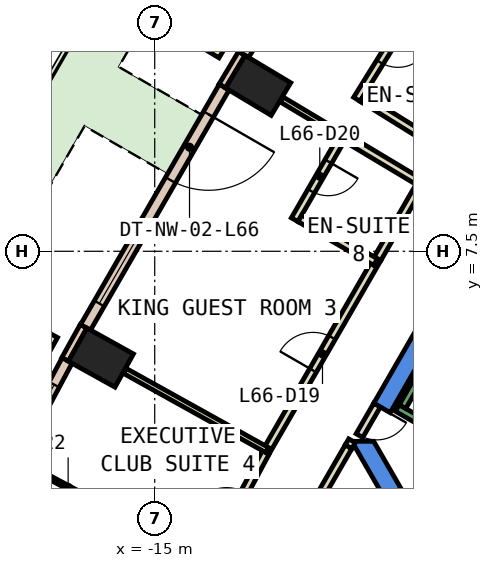
"""IFC4 building model, lengths in metres.
Left out: names, types, materials, properties, quantities, classifications, styles, units other than length and angle.
Written with IfcOpenShell. Run it as: python <this file> out.ifc"""

import sys

from ifc_helpers import new_model, si_unit, direction, frame, frame_2d, origin, origin_2d, place, context, subcontext, project, spatial, polyline, rectangle, outline, extrude, element, fill, save


model = new_model("IFC4")
c1 = context("Model", 3, precision=1e-05, world=origin(), true_north=direction((0.0, 1.0)))
c2 = subcontext(c1, "Body", "Model", "MODEL_VIEW")
j1 = project(units=[si_unit("LENGTHUNIT", "METRE"), si_unit("PLANEANGLEUNIT", "RADIAN")], contexts=[c1])
p1 = place(None, origin())
s1 = spatial("IfcSite", under=j1, at=p1, CompositionType="ELEMENT")
p2 = place(p1, origin())
s2 = spatial("IfcBuilding", under=s1, at=p2, CompositionType="ELEMENT")
p3 = place(p2, frame((0.0, 0.0, 286.4)))
s3 = spatial("IfcBuildingStorey", under=s2, at=p3, CompositionType="ELEMENT", Elevation=286.4)
for number, where, z_axis, x_axis in (
    (1, (-12.279, 11.865, 0.0), (0.0, 0.0, 1.0), (0.514, 0.858, 0.0)),
    (2, (-16.415, 4.702, 0.0), (0.0, 0.0, 1.0), (0.486, 0.874, 0.0)),
):
    element("IfcColumn", number, at=place(p3, frame(where, z_axis=z_axis, x_axis=x_axis)), inside=s3, PredefinedType="COLUMN", context=c2, shape_type="SweptSolid", body=[
        extrude(rectangle(XDim=1.0, YDim=1.4, at=origin_2d()), origin(), (0.0, 0.0, 1.0), 3.26),
    ])
p4 = place(p3, frame((0.0, 0.0, -0.6)))
e3 = element("IfcWall", 3, at=p4, inside=s3, PredefinedType="SHEAR", context=c2, shape_type="SweptSolid", body=[
    extrude(outline(polyline([(-9.236, 3.502), (-8.803, 3.253), (-4.619, 10.5), (-4.907, 11.0), (-9.236, 3.502)])), origin(), (0.0, 0.0, 1.0), 3.86),
])
p5 = place(p3, frame((0.0, 0.0, -0.6)))
e4 = element("IfcWall", 4, at=p5, inside=s3, PredefinedType="SHEAR", context=c2, shape_type="SweptSolid", body=[
    extrude(outline(polyline([(-9.815, 2.5), (-4.907, -6.0), (-4.619, -5.5), (-9.238, 2.5), (-9.815, 2.5)])), origin(), (0.0, 0.0, 1.0), 3.86),
])
p6 = place(p3, frame((-12.708, 12.706, 0.0), z_axis=(0.0, 0.0, 1.0), x_axis=(-0.513777707721, -0.857923345672, 0.0)))
e5 = element("IfcWall", 5, at=p6, inside=s3, PredefinedType="STANDARD", context=c2, shape_type="SweptSolid", body=[
    extrude(rectangle(XDim=1.0, YDim=0.2, at=frame_2d((0.5, 0.0))), origin(), (0.0, 0.0, 1.0), 3.26),
])
p7 = place(p3, frame((-16.872, 5.527, 0.0), z_axis=(0.0, 0.0, 1.0), x_axis=(-0.485850211157, -0.874042088414, 0.0)))
e6 = element("IfcWall", 6, at=p7, inside=s3, PredefinedType="STANDARD", context=c2, shape_type="SweptSolid", body=[
    extrude(rectangle(XDim=1.0, YDim=0.2, at=frame_2d((0.5, 0.0))), origin(), (0.0, 0.0, 1.0), 3.26),
])
p8 = place(p3, frame((-8.819, 18.855, 0.0), z_axis=(0.0, 0.0, 1.0), x_axis=(-0.527762071678, -0.849392250788, 0.0)))
e7 = element("IfcWall", 7, at=p8, inside=s3, PredefinedType="STANDARD", context=c2, shape_type="SweptSolid", body=[
    extrude(rectangle(XDim=7.276, YDim=0.3, at=frame_2d((3.638, 0.0))), origin(), (0.0, 0.0, 1.0), 3.26),
])
p9 = place(p8, frame((0.719, 0.0, 0.9)))
e8 = element("IfcOpeningElement", 8, at=p9, cuts=e7, PredefinedType="OPENING", context=c2, shape_type="SweptSolid", body=[
    extrude(rectangle(XDim=2.2, YDim=2.0, at=frame_2d((1.1, 1.0))), frame((0.0, 0.16, 0.0), z_axis=(0.0, -1.0, 0.0), x_axis=(1.0, 0.0, 0.0)), (0.0, 0.0, 1.0), 0.32),
])
p10 = place(p8, frame((4.357, 0.0, 0.9)))
e9 = element("IfcOpeningElement", 9, at=p10, cuts=e7, PredefinedType="OPENING", context=c2, shape_type="SweptSolid", body=[
    extrude(rectangle(XDim=2.2, YDim=2.0, at=frame_2d((1.1, 1.0))), frame((0.0, 0.16, 0.0), z_axis=(0.0, -1.0, 0.0), x_axis=(1.0, 0.0, 0.0)), (0.0, 0.0, 1.0), 0.32),
])
p11 = place(p3, frame((-13.172, 11.819, 0.0), z_axis=(0.0, 0.0, 1.0), x_axis=(-0.499945412946, -0.866056917341, 0.0)))
e10 = element("IfcWall", 10, at=p11, inside=s3, PredefinedType="STANDARD", context=c2, shape_type="SweptSolid", body=[
    extrude(rectangle(XDim=7.299, YDim=0.3, at=frame_2d((3.649, 0.0))), origin(), (0.0, 0.0, 1.0), 3.26),
])
p12 = place(p11, frame((0.825, 0.0, 0.0)))
e11 = element("IfcOpeningElement", 11, at=p12, cuts=e10, PredefinedType="OPENING", context=c2, shape_type="SweptSolid", body=[
    extrude(rectangle(XDim=2.0, YDim=2.4, at=frame_2d((1.0, 1.2))), frame((0.0, 0.16, 0.0), z_axis=(0.0, -1.0, 0.0), x_axis=(1.0, 0.0, 0.0)), (0.0, 0.0, 1.0), 0.32),
])
p13 = place(p11, frame((4.374, 0.0, 0.9)))
e12 = element("IfcOpeningElement", 12, at=p13, cuts=e10, PredefinedType="OPENING", context=c2, shape_type="SweptSolid", body=[
    extrude(rectangle(XDim=2.2, YDim=2.0, at=frame_2d((1.1, 1.0))), frame((0.0, 0.16, 0.0), z_axis=(0.0, -1.0, 0.0), x_axis=(1.0, 0.0, 0.0)), (0.0, 0.0, 1.0), 0.32),
])
p14 = place(p3, frame((-17.306, 4.626, 0.0), z_axis=(0.0, 0.0, 1.0), x_axis=(-0.471789353675, -0.881711293882, 0.0)))
e13 = element("IfcWall", 13, at=p14, inside=s3, PredefinedType="STANDARD", context=c2, shape_type="SweptSolid", body=[
    extrude(rectangle(XDim=7.277, YDim=0.3, at=frame_2d((3.638, 0.0))), origin(), (0.0, 0.0, 1.0), 3.26),
])
p15 = place(p14, frame((0.719, 0.0, 0.9)))
e14 = element("IfcOpeningElement", 14, at=p15, cuts=e13, PredefinedType="OPENING", context=c2, shape_type="SweptSolid", body=[
    extrude(rectangle(XDim=2.2, YDim=2.0, at=frame_2d((1.1, 1.0))), frame((0.0, 0.16, 0.0), z_axis=(0.0, -1.0, 0.0), x_axis=(1.0, 0.0, 0.0)), (0.0, 0.0, 1.0), 0.32),
])
p16 = place(p14, frame((4.358, 0.0, 0.9)))
e15 = element("IfcOpeningElement", 15, at=p16, cuts=e13, PredefinedType="OPENING", context=c2, shape_type="SweptSolid", body=[
    extrude(rectangle(XDim=2.2, YDim=2.0, at=frame_2d((1.1, 1.0))), frame((0.0, 0.16, 0.0), z_axis=(0.0, -1.0, 0.0), x_axis=(1.0, 0.0, 0.0)), (0.0, 0.0, 1.0), 0.32),
])
p17 = place(p3, frame((-11.736, 17.059, 0.0), z_axis=(0.0, 0.0, 1.0), x_axis=(-0.514333285091, -0.857590386984, 0.0)))
e16 = element("IfcWall", 16, at=p17, inside=s3, PredefinedType="STANDARD", context=c2, shape_type="SweptSolid", body=[
    extrude(rectangle(XDim=4.641, YDim=1.9, at=frame_2d((2.32, 0.0))), origin(), (0.0, 0.0, 1.0), 0.8),
])
p18 = place(p3, frame((-18.388, 5.691, 0.0), z_axis=(0.0, 0.0, 1.0), x_axis=(-0.485696527213, -0.874127498397, 0.0)))
e17 = element("IfcWall", 17, at=p18, inside=s3, PredefinedType="STANDARD", context=c2, shape_type="SweptSolid", body=[
    extrude(rectangle(XDim=4.641, YDim=1.9, at=frame_2d((2.321, 0.0))), origin(), (0.0, 0.0, 1.0), 0.8),
])
p19 = place(p3, frame((-9.809, 2.514, 0.0), z_axis=(0.0, 0.0, 1.0), x_axis=(-0.497849076449, -0.867263683708, 0.0)))
e18 = element("IfcWall", 18, at=p19, inside=s3, PredefinedType="PARTITIONING", context=c2, shape_type="SweptSolid", body=[
    extrude(rectangle(XDim=0.184, YDim=0.2, at=frame_2d((0.092, 0.0))), origin(), (0.0, 0.0, 1.0), 2.4),
])
p20 = place(p3, frame((-12.082, 2.207, 0.0), z_axis=(0.0, 0.0, 1.0), x_axis=(0.500123454404, 0.865954115618, 0.0)))
e19 = element("IfcWall", 19, at=p20, inside=s3, PredefinedType="PARTITIONING", context=c2, shape_type="SweptSolid", body=[
    extrude(rectangle(XDim=5.885, YDim=0.2, at=frame_2d((2.942, 0.0))), origin(), (0.0, 0.0, 1.0), 3.26),
])
p21 = place(p20, frame((2.493, 0.0, 0.0)))
e20 = element("IfcOpeningElement", 20, at=p21, cuts=e19, PredefinedType="OPENING", context=c2, shape_type="SweptSolid", body=[
    extrude(rectangle(XDim=1.0, YDim=2.1, at=frame_2d((0.5, 1.05))), frame((0.0, 0.11, 0.0), z_axis=(0.0, -1.0, 0.0), x_axis=(1.0, 0.0, 0.0)), (0.0, 0.0, 1.0), 0.22),
])
p22 = place(p3, frame((-9.139, 7.303, 0.0), z_axis=(0.0, 0.0, 1.0), x_axis=(0.499869187296, 0.866100915363, 0.0)))
e21 = element("IfcWall", 21, at=p22, inside=s3, PredefinedType="PARTITIONING", context=c2, shape_type="SweptSolid", body=[
    extrude(rectangle(XDim=2.401, YDim=0.2, at=frame_2d((1.2, 0.0))), origin(), (0.0, 0.0, 1.0), 3.26),
])
p23 = place(p3, frame((-13.666, -0.76, 0.0), z_axis=(0.0, 0.0, 1.0), x_axis=(0.471643060173, 0.881789557543, 0.0)))
e22 = element("IfcWall", 22, at=p23, inside=s3, PredefinedType="PARTITIONING", context=c2, shape_type="SweptSolid", body=[
    extrude(rectangle(XDim=3.363, YDim=0.2, at=frame_2d((1.681, 0.0))), origin(), (0.0, 0.0, 1.0), 3.26),
])
p24 = place(p23, frame((1.181, 0.0, 0.0)))
e23 = element("IfcOpeningElement", 23, at=p24, cuts=e22, PredefinedType="OPENING", context=c2, shape_type="SweptSolid", body=[
    extrude(rectangle(XDim=1.0, YDim=2.1, at=frame_2d((0.5, 1.05))), frame((0.0, 0.11, 0.0), z_axis=(0.0, -1.0, 0.0), x_axis=(1.0, 0.0, 0.0)), (0.0, 0.0, 1.0), 0.22),
])
p25 = place(p3, frame((-7.992, 14.217, 0.0), z_axis=(0.0, 0.0, 1.0), x_axis=(-0.527795797674, -0.849371294522, 0.0)))
e24 = element("IfcWall", 24, at=p25, inside=s3, PredefinedType="PARTITIONING", context=c2, shape_type="SweptSolid", body=[
    extrude(rectangle(XDim=3.2, YDim=0.2, at=frame_2d((1.6, 0.0))), origin(), (0.0, 0.0, 1.0), 3.26),
])
p26 = place(p25, frame((1.15, 0.0, 0.0)))
e25 = element("IfcOpeningElement", 25, at=p26, cuts=e24, PredefinedType="OPENING", context=c2, shape_type="SweptSolid", body=[
    extrude(rectangle(XDim=0.9, YDim=2.1, at=frame_2d((0.45, 1.05))), frame((0.0, 0.11, 0.0), z_axis=(0.0, -1.0, 0.0), x_axis=(1.0, 0.0, 0.0)), (0.0, 0.0, 1.0), 0.22),
])
p27 = place(p3, frame((-9.543, 11.531, 0.0), z_axis=(0.0, 0.0, 1.0), x_axis=(0.849400119549, -0.527749407305, 0.0)))
e26 = element("IfcWall", 26, at=p27, inside=s3, PredefinedType="PARTITIONING", context=c2, shape_type="SweptSolid", body=[
    extrude(rectangle(XDim=2.5, YDim=0.2, at=frame_2d((1.25, 0.0))), origin(), (0.0, 0.0, 1.0), 3.26),
])
p28 = place(p3, frame((-10.133, 10.58, 0.0), z_axis=(0.0, 0.0, 1.0), x_axis=(-0.857903919212, 0.513810145287, 0.0)))
e27 = element("IfcWall", 27, at=p28, inside=s3, PredefinedType="PARTITIONING", context=c2, shape_type="SweptSolid", body=[
    extrude(rectangle(XDim=1.781, YDim=0.15, at=frame_2d((0.891, 0.0))), origin(), (0.0, 0.0, 1.0), 3.26),
])
p29 = place(p3, frame((-7.989, 9.295, 0.0), z_axis=(0.0, 0.0, 1.0), x_axis=(-0.857801856135, 0.513980520654, 0.0)))
e28 = element("IfcWall", 28, at=p29, inside=s3, PredefinedType="PARTITIONING", context=c2, shape_type="SweptSolid", body=[
    extrude(rectangle(XDim=2.3, YDim=0.2, at=frame_2d((1.15, 0.0))), origin(), (0.0, 0.0, 1.0), 3.26),
])
p30 = place(p3, frame((-9.997, 10.615, 0.0), z_axis=(0.0, 0.0, 1.0), x_axis=(-0.500525697837, -0.865721679182, 0.0)))
e29 = element("IfcWall", 29, at=p30, inside=s3, PredefinedType="PARTITIONING", context=c2, shape_type="SweptSolid", body=[
    extrude(rectangle(XDim=2.639, YDim=0.2, at=frame_2d((1.32, 0.0))), origin(), (0.0, 0.0, 1.0), 3.26),
])
p31 = place(p30, frame((0.869, 0.0, 0.0)))
e30 = element("IfcOpeningElement", 30, at=p31, cuts=e29, PredefinedType="OPENING", context=c2, shape_type="SweptSolid", body=[
    extrude(rectangle(XDim=0.9, YDim=2.1, at=frame_2d((0.45, 1.05))), frame((0.0, 0.11, 0.0), z_axis=(0.0, -1.0, 0.0), x_axis=(1.0, 0.0, 0.0)), (0.0, 0.0, 1.0), 0.22),
])
p32 = place(p3, frame((-11.181, 8.367, 0.0), z_axis=(0.0, 0.0, 1.0), x_axis=(0.866053019151, -0.499952165731, 0.0)))
e31 = element("IfcWall", 31, at=p32, inside=s3, PredefinedType="PARTITIONING", context=c2, shape_type="SweptSolid", body=[
    extrude(rectangle(XDim=2.3, YDim=0.2, at=frame_2d((1.15, 0.0))), origin(), (0.0, 0.0, 1.0), 3.26),
])
p33 = place(p3, frame((-12.045, 2.272, 0.0), z_axis=(0.0, 0.0, 1.0), x_axis=(-0.873982340973, 0.485957680943, 0.0)))
e32 = element("IfcWall", 32, at=p33, inside=s3, PredefinedType="PARTITIONING", context=c2, shape_type="SweptSolid", body=[
    extrude(rectangle(XDim=4.28, YDim=0.15, at=frame_2d((2.14, 0.0))), origin(), (0.0, 0.0, 1.0), 3.26),
])
p34 = place(p3, frame((-16.0, 0.602, 0.0), z_axis=(0.0, 0.0, 1.0), x_axis=(-0.881743923375, 0.47172836844, 0.0)))
e33 = element("IfcWall", 33, at=p34, inside=s3, PredefinedType="PARTITIONING", context=c2, shape_type="SweptSolid", body=[
    extrude(rectangle(XDim=2.9, YDim=0.1, at=frame_2d((1.45, 0.0))), origin(), (0.0, 0.0, 1.0), 3.26),
])
p35 = place(p34, frame((1.0, 0.0, 0.0)))
e34 = element("IfcOpeningElement", 34, at=p35, cuts=e33, PredefinedType="OPENING", context=c2, shape_type="SweptSolid", body=[
    extrude(rectangle(XDim=0.9, YDim=2.1, at=frame_2d((0.45, 1.05))), frame((0.0, 0.06, 0.0), z_axis=(0.0, -1.0, 0.0), x_axis=(1.0, 0.0, 0.0)), (0.0, 0.0, 1.0), 0.12),
])
p36 = place(p3, frame((-9.15, 3.452, 0.0), z_axis=(0.0, 0.0, 1.0), x_axis=(-0.500079945886, -0.865979242085, 0.0)))
e35 = element("IfcWall", 35, at=p36, inside=s3, PredefinedType="PARTITIONING", context=c2, shape_type="SweptSolid", body=[
    extrude(rectangle(XDim=0.926, YDim=0.2, at=frame_2d((0.463, 0.0))), origin(), (0.0, 0.0, 1.0), 2.4),
])
p37 = place(p36, frame((0.017, 0.0, 0.0)))
e36 = element("IfcOpeningElement", 36, at=p37, cuts=e35, PredefinedType="OPENING", context=c2, shape_type="SweptSolid", body=[
    extrude(rectangle(XDim=0.9, YDim=2.1, at=frame_2d((0.45, 1.05))), frame((0.0, 0.11, 0.0), z_axis=(0.0, -1.0, 0.0), x_axis=(1.0, 0.0, 0.0)), (0.0, 0.0, 1.0), 0.22),
])
p38 = place(p3, frame((-9.901, 2.354, 0.0), z_axis=(0.0, 0.0, 1.0), x_axis=(-0.500374498448, -0.865809079014, 0.0)))
e37 = element("IfcWall", 37, at=p38, inside=s3, PredefinedType="PARTITIONING", context=c2, shape_type="SweptSolid", body=[
    extrude(rectangle(XDim=1.469, YDim=0.2, at=frame_2d((0.734, 0.0))), origin(), (0.0, 0.0, 1.0), 3.26),
])
p39 = place(p3, frame((-6.25, 2.01, 0.0), z_axis=(0.0, 0.0, 1.0), x_axis=(-0.86611865017, 0.499838457731, 0.0)))
e38 = element("IfcWall", 38, at=p39, inside=s3, PredefinedType="STANDARD", context=c2, shape_type="SweptSolid", body=[
    extrude(rectangle(XDim=2.733, YDim=0.2, at=frame_2d((1.366, 0.0))), origin(), (0.0, 0.0, 1.0), 3.26),
])
p40 = place(p3, frame((-5.03, 9.388, 0.0), z_axis=(0.0, 0.0, 1.0), x_axis=(-0.499978703459, -0.866037698999, 0.0)))
e39 = element("IfcWall", 39, at=p40, inside=s3, PredefinedType="STANDARD", context=c2, shape_type="SweptSolid", body=[
    extrude(rectangle(XDim=6.9, YDim=0.2, at=frame_2d((3.45, 0.0))), origin(), (0.0, 0.0, 1.0), 3.26),
])
p41 = place(p12, origin())
e40 = element("IfcDoor", 40, at=p41, inside=s3, OperationType="SLIDING_TO_LEFT", PredefinedType="DOOR", context=c2, shape_type="SweptSolid", body=[
    extrude(rectangle(XDim=2.0, YDim=2.4, at=frame_2d((1.0, 1.2))), frame((0.0, 0.025, 0.0), z_axis=(0.0, -1.0, 0.0), x_axis=(1.0, 0.0, 0.0)), (0.0, 0.0, 1.0), 0.05),
])
fill(e11, e40)
p42 = place(p13, origin())
e41 = element("IfcWindow", 41, at=p42, inside=s3, PartitioningType="SINGLE_PANEL", PredefinedType="WINDOW", context=c2, shape_type="SweptSolid", body=[
    extrude(rectangle(XDim=2.2, YDim=2.0, at=frame_2d((1.1, 1.0))), frame((0.0, 0.03, 0.0), z_axis=(0.0, -1.0, 0.0), x_axis=(1.0, 0.0, 0.0)), (0.0, 0.0, 1.0), 0.06),
])
fill(e12, e41)
p43 = place(p15, origin())
e42 = element("IfcWindow", 42, at=p43, inside=s3, PartitioningType="SINGLE_PANEL", PredefinedType="WINDOW", context=c2, shape_type="SweptSolid", body=[
    extrude(rectangle(XDim=2.2, YDim=2.0, at=frame_2d((1.1, 1.0))), frame((0.0, 0.03, 0.0), z_axis=(0.0, -1.0, 0.0), x_axis=(1.0, 0.0, 0.0)), (0.0, 0.0, 1.0), 0.06),
])
fill(e14, e42)
p44 = place(p26, origin())
e43 = element("IfcDoor", 43, at=p44, inside=s3, OperationType="SINGLE_SWING_LEFT", PredefinedType="DOOR", context=c2, shape_type="SweptSolid", body=[
    extrude(rectangle(XDim=0.9, YDim=2.1, at=frame_2d((0.45, 1.05))), frame((0.0, 0.025, 0.0), z_axis=(0.0, -1.0, 0.0), x_axis=(1.0, 0.0, 0.0)), (0.0, 0.0, 1.0), 0.05),
])
fill(e25, e43)
p45 = place(p21, origin())
e44 = element("IfcDoor", 44, at=p45, inside=s3, OperationType="SINGLE_SWING_LEFT", PredefinedType="DOOR", context=c2, shape_type="SweptSolid", body=[
    extrude(rectangle(XDim=1.0, YDim=2.1, at=frame_2d((0.5, 1.05))), frame((0.0, 0.025, 0.0), z_axis=(0.0, -1.0, 0.0), x_axis=(1.0, 0.0, 0.0)), (0.0, 0.0, 1.0), 0.05),
])
fill(e20, e44)
p46 = place(p31, origin())
e45 = element("IfcDoor", 45, at=p46, inside=s3, OperationType="SINGLE_SWING_LEFT", PredefinedType="DOOR", context=c2, shape_type="SweptSolid", body=[
    extrude(rectangle(XDim=0.9, YDim=2.1, at=frame_2d((0.45, 1.05))), frame((0.0, 0.025, 0.0), z_axis=(0.0, -1.0, 0.0), x_axis=(1.0, 0.0, 0.0)), (0.0, 0.0, 1.0), 0.05),
])
fill(e30, e45)
p47 = place(p35, origin())
e46 = element("IfcDoor", 46, at=p47, inside=s3, OperationType="SINGLE_SWING_LEFT", PredefinedType="DOOR", context=c2, shape_type="SweptSolid", body=[
    extrude(rectangle(XDim=0.9, YDim=2.1, at=frame_2d((0.45, 1.05))), frame((0.0, 0.025, 0.0), z_axis=(0.0, -1.0, 0.0), x_axis=(1.0, 0.0, 0.0)), (0.0, 0.0, 1.0), 0.05),
])
fill(e34, e46)
p48 = place(p37, origin())
e47 = element("IfcDoor", 47, at=p48, inside=s3, OperationType="SINGLE_SWING_LEFT", PredefinedType="DOOR", context=c2, shape_type="SweptSolid", body=[
    extrude(rectangle(XDim=0.9, YDim=2.1, at=frame_2d((0.45, 1.05))), frame((0.0, 0.025, 0.0), z_axis=(0.0, -1.0, 0.0), x_axis=(1.0, 0.0, 0.0)), (0.0, 0.0, 1.0), 0.05),
])
fill(e36, e47)
save(model, sys.argv[1])
